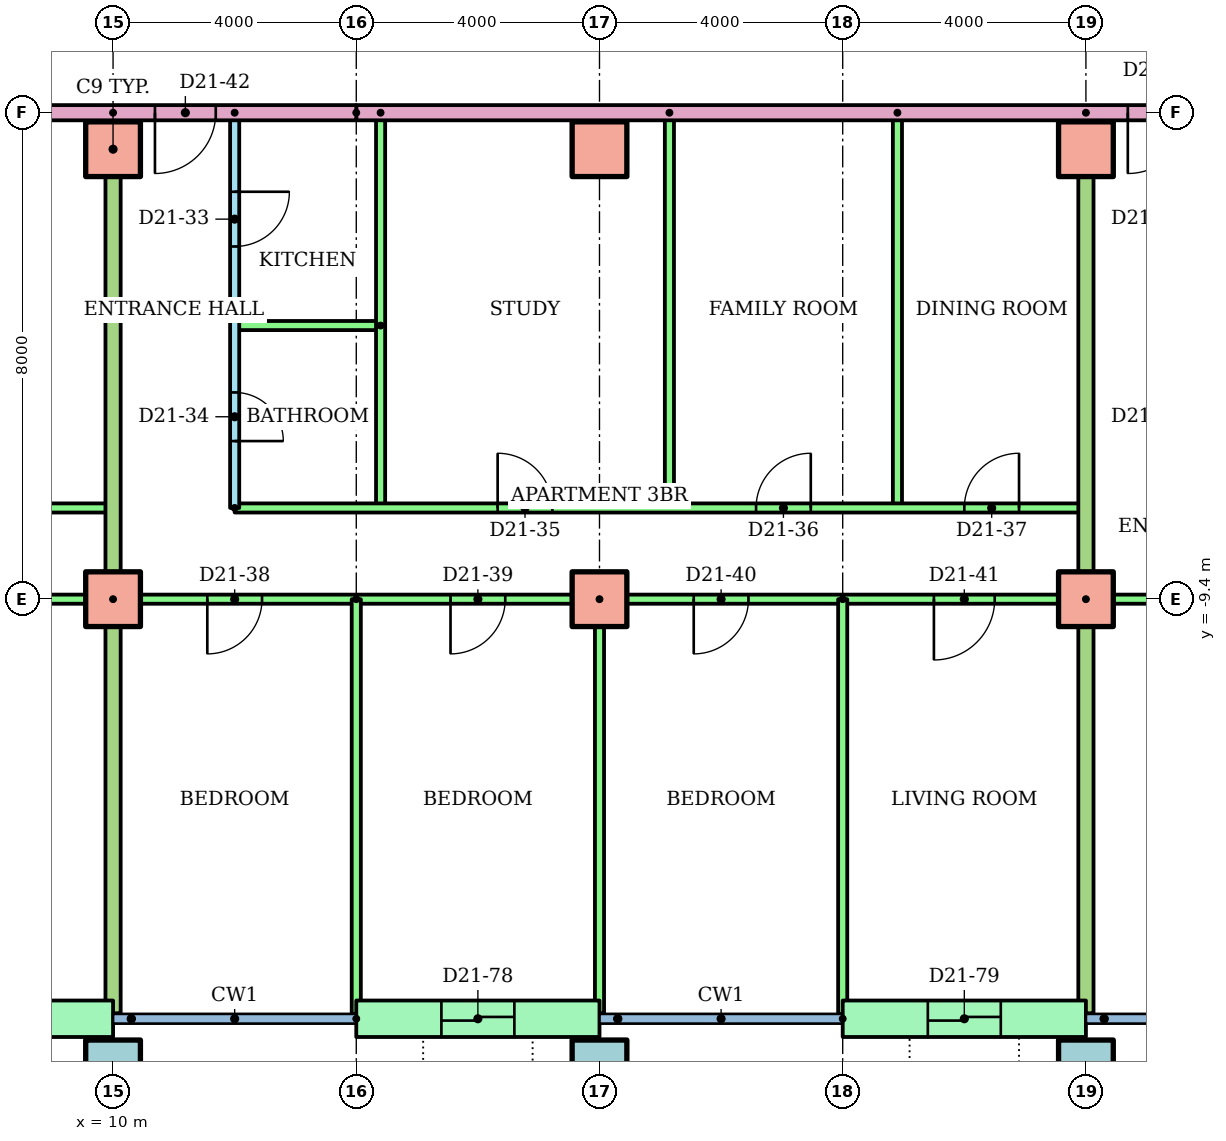
"""IFC4 building model, lengths in metres.
Left out: names, types, materials, properties, quantities, classifications, styles, units other than length and angle.
Written with IfcOpenShell. Run it as: python <this file> out.ifc"""

import sys

from ifc_helpers import new_model, si_unit, direction, frame, frame_2d, origin, origin_2d, place, context, subcontext, project, spatial, rectangle, hollow_rectangle, extrude, element, fill, save


model = new_model("IFC4")
c1 = context("Model", 3, precision=1e-05, world=origin(), true_north=direction((0.0, 1.0)))
c2 = subcontext(c1, "Body", "Model", "MODEL_VIEW")
j1 = project(units=[si_unit("LENGTHUNIT", "METRE"), si_unit("PLANEANGLEUNIT", "RADIAN")], contexts=[c1])
p1 = place(None, origin())
s1 = spatial("IfcSite", under=j1, at=p1, CompositionType="ELEMENT")
p2 = place(p1, origin())
s2 = spatial("IfcBuilding", under=s1, at=p2, CompositionType="ELEMENT")
p3 = place(p2, frame((0.0, 0.0, 83.9)))
s3 = spatial("IfcBuildingStorey", under=s2, at=p3, CompositionType="ELEMENT", Elevation=83.9)
for number, where in (
    (1, (10.0, -17.1, 0.0)),
    (2, (18.0, -17.1, 0.0)),
    (3, (26.0, -17.1, 0.0)),
):
    element("IfcColumn", number, at=place(p3, frame(where)), inside=s3, PredefinedType="COLUMN", context=c2, shape_type="SweptSolid", body=[
        extrude(hollow_rectangle(XDim=0.9, YDim=0.9, WallThickness=0.045, at=origin_2d()), origin(), (0.0, 0.0, 1.0), 3.2),
    ])
for number, where in (
    (4, (10.0, -9.4, 0.0)),
    (5, (18.0, -9.4, 0.0)),
    (6, (26.0, -9.4, 0.0)),
    (7, (10.0, -2.0, 0.0)),
    (8, (18.0, -2.0, 0.0)),
    (9, (26.0, -2.0, 0.0)),
):
    element("IfcColumn", number, at=place(p3, frame(where)), inside=s3, PredefinedType="COLUMN", context=c2, shape_type="SweptSolid", body=[
        extrude(rectangle(XDim=0.9, YDim=0.9, at=origin_2d()), origin(), (0.0, 0.0, 1.0), 3.2),
    ])
p4 = place(p3, frame((6.0, -16.3, 0.0)))
e10 = element("IfcWall", 10, at=p4, inside=s3, PredefinedType="STANDARD", context=c2, shape_type="SweptSolid", body=[
    extrude(rectangle(XDim=4.0, YDim=0.6, at=frame_2d((2.0, 0.0))), origin(), (0.0, 0.0, 1.0), 2.92),
])
p5 = place(p4, frame((1.4, 0.0, 0.0)))
e11 = element("IfcOpeningElement", 11, at=p5, cuts=e10, PredefinedType="OPENING", context=c2, shape_type="SweptSolid", body=[
    extrude(rectangle(XDim=1.2, YDim=2.1, at=frame_2d((0.6, 1.05))), frame((0.0, 0.31, 0.0), z_axis=(0.0, -1.0, 0.0), x_axis=(1.0, 0.0, 0.0)), (0.0, 0.0, 1.0), 0.62),
])
p6 = place(p3, frame((14.0, -16.3, 0.0)))
e12 = element("IfcWall", 12, at=p6, inside=s3, PredefinedType="STANDARD", context=c2, shape_type="SweptSolid", body=[
    extrude(rectangle(XDim=4.0, YDim=0.6, at=frame_2d((2.0, 0.0))), origin(), (0.0, 0.0, 1.0), 2.92),
])
p7 = place(p6, frame((1.4, 0.0, 0.0)))
e13 = element("IfcOpeningElement", 13, at=p7, cuts=e12, PredefinedType="OPENING", context=c2, shape_type="SweptSolid", body=[
    extrude(rectangle(XDim=1.2, YDim=2.1, at=frame_2d((0.6, 1.05))), frame((0.0, 0.31, 0.0), z_axis=(0.0, -1.0, 0.0), x_axis=(1.0, 0.0, 0.0)), (0.0, 0.0, 1.0), 0.62),
])
p8 = place(p3, frame((22.0, -16.3, 0.0)))
e14 = element("IfcWall", 14, at=p8, inside=s3, PredefinedType="STANDARD", context=c2, shape_type="SweptSolid", body=[
    extrude(rectangle(XDim=4.0, YDim=0.6, at=frame_2d((2.0, 0.0))), origin(), (0.0, 0.0, 1.0), 2.92),
])
p9 = place(p8, frame((1.4, 0.0, 0.0)))
e15 = element("IfcOpeningElement", 15, at=p9, cuts=e14, PredefinedType="OPENING", context=c2, shape_type="SweptSolid", body=[
    extrude(rectangle(XDim=1.2, YDim=2.1, at=frame_2d((0.6, 1.05))), frame((0.0, 0.31, 0.0), z_axis=(0.0, -1.0, 0.0), x_axis=(1.0, 0.0, 0.0)), (0.0, 0.0, 1.0), 0.62),
])
p10 = place(p3, frame((-4.0, -7.9, 0.0)))
e16 = element("IfcWall", 16, at=p10, inside=s3, PredefinedType="PARTITIONING", context=c2, shape_type="SweptSolid", body=[
    extrude(rectangle(XDim=14.0, YDim=0.15, at=frame_2d((7.0, 0.0))), origin(), (0.0, 0.0, 1.0), 2.4),
])
p11 = place(p10, frame((3.45, 0.0, 0.0)))
e17 = element("IfcOpeningElement", 17, at=p11, cuts=e16, PredefinedType="OPENING", context=c2, shape_type="SweptSolid", body=[
    extrude(rectangle(XDim=0.9, YDim=2.1, at=frame_2d((0.45, 1.05))), frame((0.0, 0.085, 0.0), z_axis=(0.0, -1.0, 0.0), x_axis=(1.0, 0.0, 0.0)), (0.0, 0.0, 1.0), 0.17),
])
p12 = place(p10, frame((6.825, 0.0, 0.0)))
e18 = element("IfcOpeningElement", 18, at=p12, cuts=e16, PredefinedType="OPENING", context=c2, shape_type="SweptSolid", body=[
    extrude(rectangle(XDim=0.9, YDim=2.1, at=frame_2d((0.45, 1.05))), frame((0.0, 0.085, 0.0), z_axis=(0.0, -1.0, 0.0), x_axis=(1.0, 0.0, 0.0)), (0.0, 0.0, 1.0), 0.17),
])
p13 = place(p10, frame((11.125, 0.0, 0.0)))
e19 = element("IfcOpeningElement", 19, at=p13, cuts=e16, PredefinedType="OPENING", context=c2, shape_type="SweptSolid", body=[
    extrude(rectangle(XDim=0.9, YDim=2.1, at=frame_2d((0.45, 1.05))), frame((0.0, 0.085, 0.0), z_axis=(0.0, -1.0, 0.0), x_axis=(1.0, 0.0, 0.0)), (0.0, 0.0, 1.0), 0.17),
])
p14 = place(p3, frame((10.0, -9.4, 0.0), z_axis=(0.0, 0.0, 1.0), x_axis=(-1.0, 0.0, 0.0)))
e20 = element("IfcWall", 20, at=p14, inside=s3, PredefinedType="PARTITIONING", context=c2, shape_type="SweptSolid", body=[
    extrude(rectangle(XDim=16.0, YDim=0.15, at=frame_2d((8.0, 0.0))), origin(), (0.0, 0.0, 1.0), 2.4),
])
p15 = place(p14, frame((13.55, 0.0, 0.0)))
e21 = element("IfcOpeningElement", 21, at=p15, cuts=e20, PredefinedType="OPENING", context=c2, shape_type="SweptSolid", body=[
    extrude(rectangle(XDim=0.9, YDim=2.1, at=frame_2d((0.45, 1.05))), frame((0.0, 0.085, 0.0), z_axis=(0.0, -1.0, 0.0), x_axis=(1.0, 0.0, 0.0)), (0.0, 0.0, 1.0), 0.17),
])
p16 = place(p14, frame((9.55, 0.0, 0.0)))
e22 = element("IfcOpeningElement", 22, at=p16, cuts=e20, PredefinedType="OPENING", context=c2, shape_type="SweptSolid", body=[
    extrude(rectangle(XDim=0.9, YDim=2.1, at=frame_2d((0.45, 1.05))), frame((0.0, 0.085, 0.0), z_axis=(0.0, -1.0, 0.0), x_axis=(1.0, 0.0, 0.0)), (0.0, 0.0, 1.0), 0.17),
])
p17 = place(p14, frame((3.5, 0.0, 0.0)))
e23 = element("IfcOpeningElement", 23, at=p17, cuts=e20, PredefinedType="OPENING", context=c2, shape_type="SweptSolid", body=[
    extrude(rectangle(XDim=1.0, YDim=2.1, at=frame_2d((0.5, 1.05))), frame((0.0, 0.085, 0.0), z_axis=(0.0, -1.0, 0.0), x_axis=(1.0, 0.0, 0.0)), (0.0, 0.0, 1.0), 0.17),
])
p18 = place(p3, frame((12.0, -1.4, 0.0), z_axis=(0.0, 0.0, 1.0), x_axis=(0.0, -1.0, 0.0)))
e24 = element("IfcWall", 24, at=p18, inside=s3, PredefinedType="PARTITIONING", context=c2, shape_type="SweptSolid", body=[
    extrude(rectangle(XDim=6.5, YDim=0.15, at=frame_2d((3.25, 0.0))), origin(), (0.0, 0.0, 1.0), 2.4),
])
p19 = place(p18, frame((1.3, 0.0, 0.0)))
e25 = element("IfcOpeningElement", 25, at=p19, cuts=e24, PredefinedType="OPENING", context=c2, shape_type="SweptSolid", body=[
    extrude(rectangle(XDim=0.9, YDim=2.1, at=frame_2d((0.45, 1.05))), frame((0.0, 0.085, 0.0), z_axis=(0.0, -1.0, 0.0), x_axis=(1.0, 0.0, 0.0)), (0.0, 0.0, 1.0), 0.17),
])
p20 = place(p18, frame((4.6, 0.0, 0.0)))
e26 = element("IfcOpeningElement", 26, at=p20, cuts=e24, PredefinedType="OPENING", context=c2, shape_type="SweptSolid", body=[
    extrude(rectangle(XDim=0.8, YDim=2.1, at=frame_2d((0.4, 1.05))), frame((0.0, 0.085, 0.0), z_axis=(0.0, -1.0, 0.0), x_axis=(1.0, 0.0, 0.0)), (0.0, 0.0, 1.0), 0.17),
])
p21 = place(p3, frame((14.4, -4.9, 0.0), z_axis=(0.0, 0.0, 1.0), x_axis=(-1.0, 0.0, 0.0)))
e27 = element("IfcWall", 27, at=p21, inside=s3, PredefinedType="PARTITIONING", context=c2, shape_type="SweptSolid", body=[
    extrude(rectangle(XDim=2.4, YDim=0.15, at=frame_2d((1.2, 0.0))), origin(), (0.0, 0.0, 1.0), 2.4),
])
for number, where, z_axis, x_axis in (
    (28, (14.4, -1.4, 0.0), (0.0, 0.0, 1.0), (0.0, -1.0, 0.0)),
    (29, (19.15, -1.4, 0.0), (0.0, 0.0, 1.0), (0.0, -1.0, 0.0)),
    (30, (22.9, -1.4, 0.0), (0.0, 0.0, 1.0), (0.0, -1.0, 0.0)),
):
    element("IfcWall", number, at=place(p3, frame(where, z_axis=z_axis, x_axis=x_axis)), inside=s3, PredefinedType="PARTITIONING", context=c2, shape_type="SweptSolid", body=[
        extrude(rectangle(XDim=6.5, YDim=0.15, at=frame_2d((3.25, 0.0))), origin(), (0.0, 0.0, 1.0), 2.4),
    ])
p22 = place(p3, frame((12.0, -7.9, 0.0)))
e31 = element("IfcWall", 31, at=p22, inside=s3, PredefinedType="PARTITIONING", context=c2, shape_type="SweptSolid", body=[
    extrude(rectangle(XDim=14.0, YDim=0.15, at=frame_2d((7.0, 0.0))), origin(), (0.0, 0.0, 1.0), 2.4),
])
p23 = place(p22, frame((4.325, 0.0, 0.0)))
e32 = element("IfcOpeningElement", 32, at=p23, cuts=e31, PredefinedType="OPENING", context=c2, shape_type="SweptSolid", body=[
    extrude(rectangle(XDim=0.9, YDim=2.1, at=frame_2d((0.45, 1.05))), frame((0.0, 0.085, 0.0), z_axis=(0.0, -1.0, 0.0), x_axis=(1.0, 0.0, 0.0)), (0.0, 0.0, 1.0), 0.17),
])
p24 = place(p22, frame((8.575, 0.0, 0.0)))
e33 = element("IfcOpeningElement", 33, at=p24, cuts=e31, PredefinedType="OPENING", context=c2, shape_type="SweptSolid", body=[
    extrude(rectangle(XDim=0.9, YDim=2.1, at=frame_2d((0.45, 1.05))), frame((0.0, 0.085, 0.0), z_axis=(0.0, -1.0, 0.0), x_axis=(1.0, 0.0, 0.0)), (0.0, 0.0, 1.0), 0.17),
])
p25 = place(p22, frame((12.0, 0.0, 0.0)))
e34 = element("IfcOpeningElement", 34, at=p25, cuts=e31, PredefinedType="OPENING", context=c2, shape_type="SweptSolid", body=[
    extrude(rectangle(XDim=0.9, YDim=2.1, at=frame_2d((0.45, 1.05))), frame((0.0, 0.085, 0.0), z_axis=(0.0, -1.0, 0.0), x_axis=(1.0, 0.0, 0.0)), (0.0, 0.0, 1.0), 0.17),
])
p26 = place(p3, frame((26.0, -9.4, 0.0), z_axis=(0.0, 0.0, 1.0), x_axis=(-1.0, 0.0, 0.0)))
e35 = element("IfcWall", 35, at=p26, inside=s3, PredefinedType="PARTITIONING", context=c2, shape_type="SweptSolid", body=[
    extrude(rectangle(XDim=16.0, YDim=0.15, at=frame_2d((8.0, 0.0))), origin(), (0.0, 0.0, 1.0), 2.4),
])
p27 = place(p26, frame((13.55, 0.0, 0.0)))
e36 = element("IfcOpeningElement", 36, at=p27, cuts=e35, PredefinedType="OPENING", context=c2, shape_type="SweptSolid", body=[
    extrude(rectangle(XDim=0.9, YDim=2.1, at=frame_2d((0.45, 1.05))), frame((0.0, 0.085, 0.0), z_axis=(0.0, -1.0, 0.0), x_axis=(1.0, 0.0, 0.0)), (0.0, 0.0, 1.0), 0.17),
])
p28 = place(p26, frame((9.55, 0.0, 0.0)))
e37 = element("IfcOpeningElement", 37, at=p28, cuts=e35, PredefinedType="OPENING", context=c2, shape_type="SweptSolid", body=[
    extrude(rectangle(XDim=0.9, YDim=2.1, at=frame_2d((0.45, 1.05))), frame((0.0, 0.085, 0.0), z_axis=(0.0, -1.0, 0.0), x_axis=(1.0, 0.0, 0.0)), (0.0, 0.0, 1.0), 0.17),
])
p29 = place(p26, frame((5.55, 0.0, 0.0)))
e38 = element("IfcOpeningElement", 38, at=p29, cuts=e35, PredefinedType="OPENING", context=c2, shape_type="SweptSolid", body=[
    extrude(rectangle(XDim=0.9, YDim=2.1, at=frame_2d((0.45, 1.05))), frame((0.0, 0.085, 0.0), z_axis=(0.0, -1.0, 0.0), x_axis=(1.0, 0.0, 0.0)), (0.0, 0.0, 1.0), 0.17),
])
p30 = place(p26, frame((1.5, 0.0, 0.0)))
e39 = element("IfcOpeningElement", 39, at=p30, cuts=e35, PredefinedType="OPENING", context=c2, shape_type="SweptSolid", body=[
    extrude(rectangle(XDim=1.0, YDim=2.1, at=frame_2d((0.5, 1.05))), frame((0.0, 0.085, 0.0), z_axis=(0.0, -1.0, 0.0), x_axis=(1.0, 0.0, 0.0)), (0.0, 0.0, 1.0), 0.17),
])
p31 = place(p3, frame((14.0, -9.4, 0.0), z_axis=(0.0, 0.0, 1.0), x_axis=(0.0, -1.0, 0.0)))
e40 = element("IfcWall", 40, at=p31, inside=s3, PredefinedType="PARTITIONING", context=c2, shape_type="SweptSolid", body=[
    extrude(rectangle(XDim=6.821, YDim=0.15, at=frame_2d((3.411, 0.0))), origin(), (0.0, 0.0, 1.0), 2.4),
])
p32 = place(p3, frame((18.0, -9.4, 0.0), z_axis=(0.0, 0.0, 1.0), x_axis=(0.0, -1.0, 0.0)))
e41 = element("IfcWall", 41, at=p32, inside=s3, PredefinedType="PARTITIONING", context=c2, shape_type="SweptSolid", body=[
    extrude(rectangle(XDim=6.81, YDim=0.15, at=frame_2d((3.405, 0.0))), origin(), (0.0, 0.0, 1.0), 2.4),
])
p33 = place(p3, frame((22.0, -9.4, 0.0), z_axis=(0.0, 0.0, 1.0), x_axis=(0.0, -1.0, 0.0)))
e42 = element("IfcWall", 42, at=p33, inside=s3, PredefinedType="PARTITIONING", context=c2, shape_type="SweptSolid", body=[
    extrude(rectangle(XDim=6.821, YDim=0.15, at=frame_2d((3.411, 0.0))), origin(), (0.0, 0.0, 1.0), 2.4),
])
p34 = place(p3, frame((10.0, -1.4, 0.0), z_axis=(0.0, 0.0, 1.0), x_axis=(0.0, -1.0, 0.0)))
e43 = element("IfcWall", 43, at=p34, inside=s3, PredefinedType="PARTITIONING", context=c2, shape_type="SweptSolid", body=[
    extrude(rectangle(XDim=14.81, YDim=0.25, at=frame_2d((7.405, 0.0))), origin(), (0.0, 0.0, 1.0), 2.4),
])
p35 = place(p3, frame((40.62, -9.4, 0.0), z_axis=(0.0, 0.0, 1.0), x_axis=(-1.0, 0.0, 0.0)))
e44 = element("IfcWall", 44, at=p35, inside=s3, PredefinedType="PARTITIONING", context=c2, shape_type="SweptSolid", body=[
    extrude(rectangle(XDim=14.62, YDim=0.15, at=frame_2d((7.31, 0.0))), origin(), (0.0, 0.0, 1.0), 2.4),
])
p36 = place(p35, frame((10.12, 0.0, 0.0)))
e45 = element("IfcOpeningElement", 45, at=p36, cuts=e44, PredefinedType="OPENING", context=c2, shape_type="SweptSolid", body=[
    extrude(rectangle(XDim=1.0, YDim=2.1, at=frame_2d((0.5, 1.05))), frame((0.0, 0.085, 0.0), z_axis=(0.0, -1.0, 0.0), x_axis=(1.0, 0.0, 0.0)), (0.0, 0.0, 1.0), 0.17),
])
p37 = place(p35, frame((2.97, 0.0, 0.0)))
e46 = element("IfcOpeningElement", 46, at=p37, cuts=e44, PredefinedType="OPENING", context=c2, shape_type="SweptSolid", body=[
    extrude(rectangle(XDim=0.9, YDim=2.1, at=frame_2d((0.45, 1.05))), frame((0.0, 0.085, 0.0), z_axis=(0.0, -1.0, 0.0), x_axis=(1.0, 0.0, 0.0)), (0.0, 0.0, 1.0), 0.17),
])
p38 = place(p3, frame((26.0, -1.4, 0.0), z_axis=(0.0, 0.0, 1.0), x_axis=(0.0, -1.0, 0.0)))
e47 = element("IfcWall", 47, at=p38, inside=s3, PredefinedType="PARTITIONING", context=c2, shape_type="SweptSolid", body=[
    extrude(rectangle(XDim=14.81, YDim=0.25, at=frame_2d((7.405, 0.0))), origin(), (0.0, 0.0, 1.0), 2.4),
])
p39 = place(p3, frame((29.0, -1.4, 0.0), z_axis=(0.0, 0.0, 1.0), x_axis=(-1.0, 0.0, 0.0)))
e48 = element("IfcWall", 48, at=p39, inside=s3, PredefinedType="PARTITIONING", context=c2, shape_type="SweptSolid", body=[
    extrude(rectangle(XDim=15.0, YDim=0.25, at=frame_2d((7.5, 0.0))), origin(), (0.0, 0.0, 1.0), 2.4),
])
p40 = place(p39, frame((1.311, 0.0, 0.0)))
e49 = element("IfcOpeningElement", 49, at=p40, cuts=e48, PredefinedType="OPENING", context=c2, shape_type="SweptSolid", body=[
    extrude(rectangle(XDim=1.0, YDim=2.1, at=frame_2d((0.5, 1.05))), frame((0.0, 0.135, 0.0), z_axis=(0.0, -1.0, 0.0), x_axis=(1.0, 0.0, 0.0)), (0.0, 0.0, 1.0), 0.27),
])
p41 = place(p3, frame((14.0, -1.4, 0.0), z_axis=(0.0, 0.0, 1.0), x_axis=(-1.0, 0.0, 0.0)))
e50 = element("IfcWall", 50, at=p41, inside=s3, PredefinedType="PARTITIONING", context=c2, shape_type="SweptSolid", body=[
    extrude(rectangle(XDim=28.0, YDim=0.25, at=frame_2d((14.0, 0.0))), origin(), (0.0, 0.0, 1.0), 2.4),
])
p42 = place(p41, frame((20.689, 0.0, 0.0)))
e51 = element("IfcOpeningElement", 51, at=p42, cuts=e50, PredefinedType="OPENING", context=c2, shape_type="SweptSolid", body=[
    extrude(rectangle(XDim=1.0, YDim=2.1, at=frame_2d((0.5, 1.05))), frame((0.0, 0.135, 0.0), z_axis=(0.0, -1.0, 0.0), x_axis=(1.0, 0.0, 0.0)), (0.0, 0.0, 1.0), 0.27),
])
p43 = place(p41, frame((18.311, 0.0, 0.0)))
e52 = element("IfcOpeningElement", 52, at=p43, cuts=e50, PredefinedType="OPENING", context=c2, shape_type="SweptSolid", body=[
    extrude(rectangle(XDim=1.0, YDim=2.1, at=frame_2d((0.5, 1.05))), frame((0.0, 0.135, 0.0), z_axis=(0.0, -1.0, 0.0), x_axis=(1.0, 0.0, 0.0)), (0.0, 0.0, 1.0), 0.27),
])
p44 = place(p41, frame((2.311, 0.0, 0.0)))
e53 = element("IfcOpeningElement", 53, at=p44, cuts=e50, PredefinedType="OPENING", context=c2, shape_type="SweptSolid", body=[
    extrude(rectangle(XDim=1.0, YDim=2.1, at=frame_2d((0.5, 1.05))), frame((0.0, 0.135, 0.0), z_axis=(0.0, -1.0, 0.0), x_axis=(1.0, 0.0, 0.0)), (0.0, 0.0, 1.0), 0.27),
])
p45 = place(p19, origin())
e54 = element("IfcDoor", 54, at=p45, inside=s3, OperationType="SINGLE_SWING_LEFT", PredefinedType="DOOR", context=c2, shape_type="SweptSolid", body=[
    extrude(rectangle(XDim=0.9, YDim=2.1, at=frame_2d((0.45, 1.05))), frame((0.0, 0.025, 0.0), z_axis=(0.0, -1.0, 0.0), x_axis=(1.0, 0.0, 0.0)), (0.0, 0.0, 1.0), 0.05),
])
fill(e25, e54)
p46 = place(p20, origin())
e55 = element("IfcDoor", 55, at=p46, inside=s3, OperationType="SINGLE_SWING_RIGHT", PredefinedType="DOOR", context=c2, shape_type="SweptSolid", body=[
    extrude(rectangle(XDim=0.8, YDim=2.1, at=frame_2d((0.4, 1.05))), frame((0.0, 0.025, 0.0), z_axis=(0.0, -1.0, 0.0), x_axis=(1.0, 0.0, 0.0)), (0.0, 0.0, 1.0), 0.05),
])
fill(e26, e55)
p47 = place(p23, origin())
e56 = element("IfcDoor", 56, at=p47, inside=s3, OperationType="SINGLE_SWING_LEFT", PredefinedType="DOOR", context=c2, shape_type="SweptSolid", body=[
    extrude(rectangle(XDim=0.9, YDim=2.1, at=frame_2d((0.45, 1.05))), frame((0.0, 0.025, 0.0), z_axis=(0.0, -1.0, 0.0), x_axis=(1.0, 0.0, 0.0)), (0.0, 0.0, 1.0), 0.05),
])
fill(e32, e56)
p48 = place(p24, origin())
e57 = element("IfcDoor", 57, at=p48, inside=s3, OperationType="SINGLE_SWING_RIGHT", PredefinedType="DOOR", context=c2, shape_type="SweptSolid", body=[
    extrude(rectangle(XDim=0.9, YDim=2.1, at=frame_2d((0.45, 1.05))), frame((0.0, 0.025, 0.0), z_axis=(0.0, -1.0, 0.0), x_axis=(1.0, 0.0, 0.0)), (0.0, 0.0, 1.0), 0.05),
])
fill(e33, e57)
p49 = place(p25, origin())
e58 = element("IfcDoor", 58, at=p49, inside=s3, OperationType="SINGLE_SWING_RIGHT", PredefinedType="DOOR", context=c2, shape_type="SweptSolid", body=[
    extrude(rectangle(XDim=0.9, YDim=2.1, at=frame_2d((0.45, 1.05))), frame((0.0, 0.025, 0.0), z_axis=(0.0, -1.0, 0.0), x_axis=(1.0, 0.0, 0.0)), (0.0, 0.0, 1.0), 0.05),
])
fill(e34, e58)
p50 = place(p27, origin())
e59 = element("IfcDoor", 59, at=p50, inside=s3, OperationType="SINGLE_SWING_RIGHT", PredefinedType="DOOR", context=c2, shape_type="SweptSolid", body=[
    extrude(rectangle(XDim=0.9, YDim=2.1, at=frame_2d((0.45, 1.05))), frame((0.0, 0.025, 0.0), z_axis=(0.0, -1.0, 0.0), x_axis=(1.0, 0.0, 0.0)), (0.0, 0.0, 1.0), 0.05),
])
fill(e36, e59)
p51 = place(p28, origin())
e60 = element("IfcDoor", 60, at=p51, inside=s3, OperationType="SINGLE_SWING_RIGHT", PredefinedType="DOOR", context=c2, shape_type="SweptSolid", body=[
    extrude(rectangle(XDim=0.9, YDim=2.1, at=frame_2d((0.45, 1.05))), frame((0.0, 0.025, 0.0), z_axis=(0.0, -1.0, 0.0), x_axis=(1.0, 0.0, 0.0)), (0.0, 0.0, 1.0), 0.05),
])
fill(e37, e60)
p52 = place(p29, origin())
e61 = element("IfcDoor", 61, at=p52, inside=s3, OperationType="SINGLE_SWING_RIGHT", PredefinedType="DOOR", context=c2, shape_type="SweptSolid", body=[
    extrude(rectangle(XDim=0.9, YDim=2.1, at=frame_2d((0.45, 1.05))), frame((0.0, 0.025, 0.0), z_axis=(0.0, -1.0, 0.0), x_axis=(1.0, 0.0, 0.0)), (0.0, 0.0, 1.0), 0.05),
])
fill(e38, e61)
p53 = place(p30, origin())
e62 = element("IfcDoor", 62, at=p53, inside=s3, OperationType="SINGLE_SWING_RIGHT", PredefinedType="DOOR", context=c2, shape_type="SweptSolid", body=[
    extrude(rectangle(XDim=1.0, YDim=2.1, at=frame_2d((0.5, 1.05))), frame((0.0, 0.025, 0.0), z_axis=(0.0, -1.0, 0.0), x_axis=(1.0, 0.0, 0.0)), (0.0, 0.0, 1.0), 0.05),
])
fill(e39, e62)
p54 = place(p44, origin())
e63 = element("IfcDoor", 63, at=p54, inside=s3, OperationType="SINGLE_SWING_RIGHT", PredefinedType="DOOR", context=c2, shape_type="SweptSolid", body=[
    extrude(rectangle(XDim=1.0, YDim=2.1, at=frame_2d((0.5, 1.05))), frame((0.0, 0.025, 0.0), z_axis=(0.0, -1.0, 0.0), x_axis=(1.0, 0.0, 0.0)), (0.0, 0.0, 1.0), 0.05),
])
fill(e53, e63)
p55 = place(p40, origin())
e64 = element("IfcDoor", 64, at=p55, inside=s3, OperationType="SINGLE_SWING_RIGHT", PredefinedType="DOOR", context=c2, shape_type="SweptSolid", body=[
    extrude(rectangle(XDim=1.0, YDim=2.1, at=frame_2d((0.5, 1.05))), frame((0.0, 0.025, 0.0), z_axis=(0.0, -1.0, 0.0), x_axis=(1.0, 0.0, 0.0)), (0.0, 0.0, 1.0), 0.05),
])
fill(e49, e64)
p56 = place(p7, origin())
e65 = element("IfcDoor", 65, at=p56, inside=s3, OperationType="SLIDING_TO_LEFT", PredefinedType="DOOR", context=c2, shape_type="SweptSolid", body=[
    extrude(rectangle(XDim=1.2, YDim=2.1, at=frame_2d((0.6, 1.05))), frame((0.0, 0.025, 0.0), z_axis=(0.0, -1.0, 0.0), x_axis=(1.0, 0.0, 0.0)), (0.0, 0.0, 1.0), 0.05),
])
fill(e13, e65)
p57 = place(p9, origin())
e66 = element("IfcDoor", 66, at=p57, inside=s3, OperationType="SLIDING_TO_LEFT", PredefinedType="DOOR", context=c2, shape_type="SweptSolid", body=[
    extrude(rectangle(XDim=1.2, YDim=2.1, at=frame_2d((0.6, 1.05))), frame((0.0, 0.025, 0.0), z_axis=(0.0, -1.0, 0.0), x_axis=(1.0, 0.0, 0.0)), (0.0, 0.0, 1.0), 0.05),
])
fill(e15, e66)
save(model, sys.argv[1])
